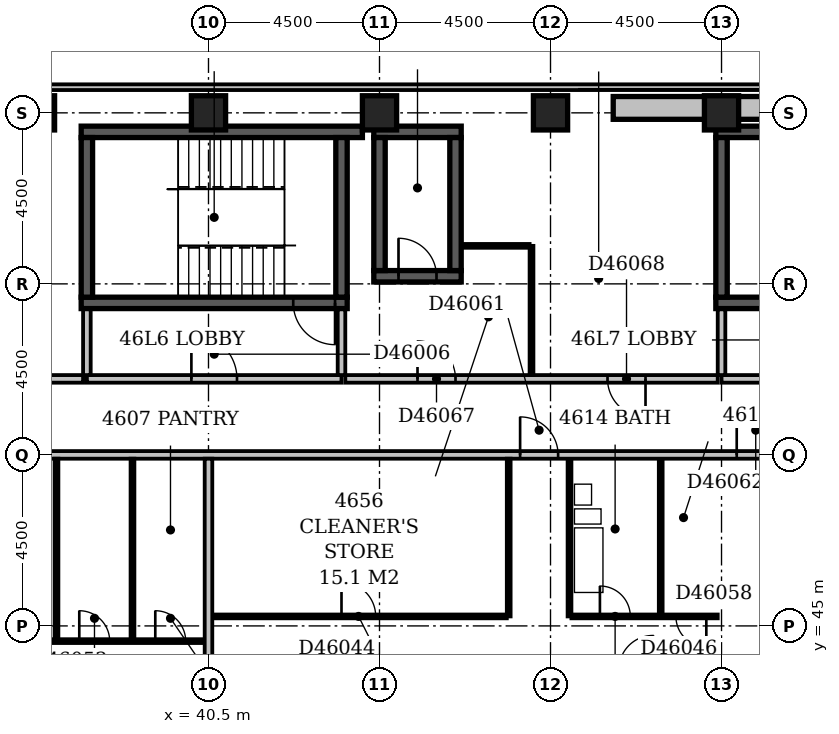
"""IFC4 building model, lengths in metres.
Left out: names, types, materials, properties, quantities, classifications, styles, units other than length and angle.
Written with IfcOpenShell. Run it as: python <this file> out.ifc"""

import sys

from ifc_helpers import new_model, si_unit, direction, frame, frame_2d, origin, origin_2d, place, context, subcontext, project, spatial, rectangle, extrude, element, fill, save


model = new_model("IFC4")
c1 = context("Model", 3, precision=1e-05, world=origin(), true_north=direction((0.0, 1.0)))
c2 = subcontext(c1, "Body", "Model", "MODEL_VIEW")
j1 = project(units=[si_unit("LENGTHUNIT", "METRE"), si_unit("PLANEANGLEUNIT", "RADIAN")], contexts=[c1])
p1 = place(None, origin())
s1 = spatial("IfcSite", under=j1, at=p1, CompositionType="ELEMENT")
p2 = place(p1, origin())
s2 = spatial("IfcBuilding", under=s1, at=p2, CompositionType="ELEMENT")
p3 = place(p2, frame((0.0, 0.0, 182.6)))
s3 = spatial("IfcBuildingStorey", under=s2, at=p3, CompositionType="ELEMENT", Elevation=182.6)
p4 = place(p3, frame((37.15, 53.5, -0.3), z_axis=(0.0, 0.0, 1.0), x_axis=(1.0, 0.0, 0.0)))
e1 = element("IfcWall", 1, at=p4, inside=s3, PredefinedType="SHEAR", context=c2, shape_type="SweptSolid", body=[
    extrude(rectangle(XDim=7.0, YDim=0.3, at=frame_2d((3.5, 0.0))), origin(), (0.0, 0.0, 1.0), 3.55),
])
p5 = place(p4, frame((5.58, 0.0, 0.3)))
e2 = element("IfcOpeningElement", 2, at=p5, cuts=e1, PredefinedType="OPENING", context=c2, shape_type="SweptSolid", body=[
    extrude(rectangle(XDim=1.1, YDim=2.1, at=frame_2d((0.55, 1.05))), frame((0.0, 0.162, 0.0), z_axis=(0.0, -1.0, 0.0), x_axis=(1.0, 0.0, 0.0)), (0.0, 0.0, 1.0), 0.324),
])
p6 = place(p3, frame((37.15, 58.0, -0.3), z_axis=(0.0, 0.0, 1.0), x_axis=(1.0, 0.0, 0.0)))
e3 = element("IfcWall", 3, at=p6, inside=s3, PredefinedType="SHEAR", context=c2, shape_type="SweptSolid", body=[
    extrude(rectangle(XDim=7.4, YDim=0.3, at=frame_2d((3.7, 0.0))), origin(), (0.0, 0.0, 1.0), 3.55),
])
for number, where, z_axis, x_axis in (
    (4, (37.3, 53.65, -0.3), (0.0, 0.0, 1.0), (0.0, 1.0, 0.0)),
    (5, (44.0, 53.65, -0.3), (0.0, 0.0, 1.0), (0.0, 1.0, 0.0)),
):
    element("IfcWall", number, at=place(p3, frame(where, z_axis=z_axis, x_axis=x_axis)), inside=s3, PredefinedType="SHEAR", context=c2, shape_type="SweptSolid", body=[
        extrude(rectangle(XDim=4.2, YDim=0.3, at=frame_2d((2.1, 0.0))), origin(), (0.0, 0.0, 1.0), 3.55),
    ])
p7 = place(p3, frame((44.85, 54.2, -0.3), z_axis=(0.0, 0.0, 1.0), x_axis=(1.0, 0.0, 0.0)))
e6 = element("IfcWall", 6, at=p7, inside=s3, PredefinedType="SHEAR", context=c2, shape_type="SweptSolid", body=[
    extrude(rectangle(XDim=2.3, YDim=0.3, at=frame_2d((1.15, 0.0))), origin(), (0.0, 0.0, 1.0), 3.55),
])
p8 = place(p7, frame((0.65, 0.0, 0.3)))
e7 = element("IfcOpeningElement", 7, at=p8, cuts=e6, PredefinedType="OPENING", context=c2, shape_type="SweptSolid", body=[
    extrude(rectangle(XDim=1.0, YDim=2.1, at=frame_2d((0.5, 1.05))), frame((0.0, 0.162, 0.0), z_axis=(0.0, -1.0, 0.0), x_axis=(1.0, 0.0, 0.0)), (0.0, 0.0, 1.0), 0.324),
])
p9 = place(p3, frame((44.85, 58.0, -0.3), z_axis=(0.0, 0.0, 1.0), x_axis=(1.0, 0.0, 0.0)))
e8 = element("IfcWall", 8, at=p9, inside=s3, PredefinedType="SHEAR", context=c2, shape_type="SweptSolid", body=[
    extrude(rectangle(XDim=2.3, YDim=0.3, at=frame_2d((1.15, 0.0))), origin(), (0.0, 0.0, 1.0), 3.55),
])
for number, where, z_axis, x_axis in (
    (9, (45.0, 54.35, -0.3), (0.0, 0.0, 1.0), (0.0, 1.0, 0.0)),
    (10, (47.0, 54.35, -0.3), (0.0, 0.0, 1.0), (0.0, 1.0, 0.0)),
):
    element("IfcWall", number, at=place(p3, frame(where, z_axis=z_axis, x_axis=x_axis)), inside=s3, PredefinedType="SHEAR", context=c2, shape_type="SweptSolid", body=[
        extrude(rectangle(XDim=3.5, YDim=0.3, at=frame_2d((1.75, 0.0))), origin(), (0.0, 0.0, 1.0), 3.55),
    ])
p10 = place(p3, frame((53.85, 53.5, -0.3), z_axis=(0.0, 0.0, 1.0), x_axis=(1.0, 0.0, 0.0)))
e11 = element("IfcWall", 11, at=p10, inside=s3, PredefinedType="SHEAR", context=c2, shape_type="SweptSolid", body=[
    extrude(rectangle(XDim=7.0, YDim=0.3, at=frame_2d((3.5, 0.0))), origin(), (0.0, 0.0, 1.0), 3.55),
])
p11 = place(p10, frame((5.58, 0.0, 0.3)))
e12 = element("IfcOpeningElement", 12, at=p11, cuts=e11, PredefinedType="OPENING", context=c2, shape_type="SweptSolid", body=[
    extrude(rectangle(XDim=1.1, YDim=2.1, at=frame_2d((0.55, 1.05))), frame((0.0, 0.162, 0.0), z_axis=(0.0, -1.0, 0.0), x_axis=(1.0, 0.0, 0.0)), (0.0, 0.0, 1.0), 0.324),
])
p12 = place(p3, frame((53.85, 58.0, -0.3), z_axis=(0.0, 0.0, 1.0), x_axis=(1.0, 0.0, 0.0)))
e13 = element("IfcWall", 13, at=p12, inside=s3, PredefinedType="SHEAR", context=c2, shape_type="SweptSolid", body=[
    extrude(rectangle(XDim=7.0, YDim=0.3, at=frame_2d((3.5, 0.0))), origin(), (0.0, 0.0, 1.0), 3.55),
])
p13 = place(p3, frame((54.0, 53.65, -0.3), z_axis=(0.0, 0.0, 1.0), x_axis=(0.0, 1.0, 0.0)))
e14 = element("IfcWall", 14, at=p13, inside=s3, PredefinedType="SHEAR", context=c2, shape_type="SweptSolid", body=[
    extrude(rectangle(XDim=4.2, YDim=0.3, at=frame_2d((2.1, 0.0))), origin(), (0.0, 0.0, 1.0), 3.55),
])
for number, where, z_axis, x_axis in (
    (15, (36.0, 58.5, -0.3), (0.0, 0.0, 1.0), (1.0, 0.0, 0.0)),
    (16, (40.5, 58.5, -0.3), (0.0, 0.0, 1.0), (1.0, 0.0, 0.0)),
    (17, (45.0, 58.5, -0.3), (0.0, 0.0, 1.0), (1.0, 0.0, 0.0)),
    (18, (49.5, 58.5, -0.3), (0.0, 0.0, 1.0), (1.0, 0.0, 0.0)),
    (19, (54.0, 58.5, -0.3), (0.0, 0.0, 1.0), (1.0, 0.0, 0.0)),
):
    element("IfcColumn", number, at=place(p3, frame(where, z_axis=z_axis, x_axis=x_axis)), inside=s3, PredefinedType="COLUMN", context=c2, shape_type="SweptSolid", body=[
        extrude(rectangle(XDim=0.9, YDim=0.9, at=origin_2d()), origin(), (0.0, 0.0, 1.0), 3.55),
    ])
p14 = place(p3, frame((68.1, 59.175, 0.0), z_axis=(0.0, 0.0, 1.0), x_axis=(-1.0, 0.0, 0.0)))
e20 = element("IfcWall", 20, at=p14, inside=s3, PredefinedType="STANDARD", context=c2, shape_type="SweptSolid", body=[
    extrude(rectangle(XDim=68.85, YDim=0.15, at=frame_2d((34.425, 0.0))), origin(), (0.0, 0.0, 1.0), 2.7),
])
p15 = place(p3, frame((51.15, 58.63, 3.6), z_axis=(0.0, 0.0, 1.0), x_axis=(1.0, 0.0, 0.0)))
e21 = element("IfcWall", 21, at=p15, inside=s3, PredefinedType="STANDARD", context=c2, shape_type="SweptSolid", body=[
    extrude(rectangle(XDim=16.38, YDim=0.6, at=frame_2d((8.19, 0.0))), origin(), (0.0, 0.0, 1.0), 0.6),
])
p16 = place(p3, frame((37.3, 51.5, 0.0), z_axis=(0.0, 0.0, 1.0), x_axis=(1.0, 0.0, 0.0)))
e22 = element("IfcWall", 22, at=p16, inside=s3, PredefinedType="PARTITIONING", context=c2, shape_type="SweptSolid", body=[
    extrude(rectangle(XDim=6.7, YDim=0.2, at=frame_2d((3.35, 0.0))), origin(), (0.0, 0.0, 1.0), 3.25),
])
p17 = place(p16, frame((2.75, 0.0, 0.0)))
e23 = element("IfcOpeningElement", 23, at=p17, cuts=e22, PredefinedType="OPENING", context=c2, shape_type="SweptSolid", body=[
    extrude(rectangle(XDim=1.2, YDim=2.1, at=frame_2d((0.6, 1.05))), frame((0.0, 0.112, 0.0), z_axis=(0.0, -1.0, 0.0), x_axis=(1.0, 0.0, 0.0)), (0.0, 0.0, 1.0), 0.224),
])
for number, where, z_axis, x_axis in (
    (24, (44.0, 51.6, 0.0), (0.0, 0.0, 1.0), (0.0, 1.0, 0.0)),
    (25, (37.3, 51.6, 0.0), (0.0, 0.0, 1.0), (0.0, 1.0, 0.0)),
):
    element("IfcWall", number, at=place(p3, frame(where, z_axis=z_axis, x_axis=x_axis)), inside=s3, PredefinedType="PARTITIONING", context=c2, shape_type="SweptSolid", body=[
        extrude(rectangle(XDim=1.73, YDim=0.2, at=frame_2d((0.865, 0.0))), origin(), (0.0, 0.0, 1.0), 3.25),
    ])
p18 = place(p3, frame((54.0, 51.5, 0.0), z_axis=(0.0, 0.0, 1.0), x_axis=(1.0, 0.0, 0.0)))
e26 = element("IfcWall", 26, at=p18, inside=s3, PredefinedType="PARTITIONING", context=c2, shape_type="SweptSolid", body=[
    extrude(rectangle(XDim=6.7, YDim=0.2, at=frame_2d((3.35, 0.0))), origin(), (0.0, 0.0, 1.0), 3.25),
])
p19 = place(p18, frame((2.75, 0.0, 0.0)))
e27 = element("IfcOpeningElement", 27, at=p19, cuts=e26, PredefinedType="OPENING", context=c2, shape_type="SweptSolid", body=[
    extrude(rectangle(XDim=1.2, YDim=2.1, at=frame_2d((0.6, 1.05))), frame((0.0, 0.112, 0.0), z_axis=(0.0, -1.0, 0.0), x_axis=(1.0, 0.0, 0.0)), (0.0, 0.0, 1.0), 0.224),
])
p20 = place(p3, frame((54.0, 51.6, 0.0), z_axis=(0.0, 0.0, 1.0), x_axis=(0.0, 1.0, 0.0)))
e28 = element("IfcWall", 28, at=p20, inside=s3, PredefinedType="PARTITIONING", context=c2, shape_type="SweptSolid", body=[
    extrude(rectangle(XDim=1.73, YDim=0.2, at=frame_2d((0.865, 0.0))), origin(), (0.0, 0.0, 1.0), 3.25),
])
p21 = place(p3, frame((40.5, 36.45, 0.0), z_axis=(0.0, 0.0, 1.0), x_axis=(0.0, 1.0, 0.0)))
e29 = element("IfcWall", 29, at=p21, inside=s3, PredefinedType="PARTITIONING", context=c2, shape_type="SweptSolid", body=[
    extrude(rectangle(XDim=12.95, YDim=0.2, at=frame_2d((6.475, 0.0))), origin(), (0.0, 0.0, 1.0), 3.25),
])
p22 = place(p3, frame((31.05, 44.6, 0.0), z_axis=(0.0, 0.0, 1.0), x_axis=(1.0, 0.0, 0.0)))
e30 = element("IfcWall", 30, at=p22, inside=s3, PredefinedType="PARTITIONING", context=c2, shape_type="SweptSolid", body=[
    extrude(rectangle(XDim=9.35, YDim=0.1, at=frame_2d((4.675, 0.0))), origin(), (0.0, 0.0, 1.0), 3.25),
])
p23 = place(p22, frame((0.75, 0.0, 0.0)))
e31 = element("IfcOpeningElement", 31, at=p23, cuts=e30, PredefinedType="OPENING", context=c2, shape_type="SweptSolid", body=[
    extrude(rectangle(XDim=0.8, YDim=2.1, at=frame_2d((0.4, 1.05))), frame((0.0, 0.062, 0.0), z_axis=(0.0, -1.0, 0.0), x_axis=(1.0, 0.0, 0.0)), (0.0, 0.0, 1.0), 0.124),
])
p24 = place(p22, frame((8.05, 0.0, 0.0)))
e32 = element("IfcOpeningElement", 32, at=p24, cuts=e30, PredefinedType="OPENING", context=c2, shape_type="SweptSolid", body=[
    extrude(rectangle(XDim=0.8, YDim=2.1, at=frame_2d((0.4, 1.05))), frame((0.0, 0.062, 0.0), z_axis=(0.0, -1.0, 0.0), x_axis=(1.0, 0.0, 0.0)), (0.0, 0.0, 1.0), 0.124),
])
p25 = place(p22, frame((4.25, 0.0, 0.0)))
e33 = element("IfcOpeningElement", 33, at=p25, cuts=e30, PredefinedType="OPENING", context=c2, shape_type="SweptSolid", body=[
    extrude(rectangle(XDim=0.8, YDim=2.1, at=frame_2d((0.4, 1.05))), frame((0.0, 0.062, 0.0), z_axis=(0.0, -1.0, 0.0), x_axis=(1.0, 0.0, 0.0)), (0.0, 0.0, 1.0), 0.124),
])
p26 = place(p22, frame((6.05, 0.0, 0.0)))
e34 = element("IfcOpeningElement", 34, at=p26, cuts=e30, PredefinedType="OPENING", context=c2, shape_type="SweptSolid", body=[
    extrude(rectangle(XDim=0.8, YDim=2.1, at=frame_2d((0.4, 1.05))), frame((0.0, 0.062, 0.0), z_axis=(0.0, -1.0, 0.0), x_axis=(1.0, 0.0, 0.0)), (0.0, 0.0, 1.0), 0.124),
])
p27 = place(p22, frame((2.7, 0.0, 0.0)))
e35 = element("IfcOpeningElement", 35, at=p27, cuts=e30, PredefinedType="OPENING", context=c2, shape_type="SweptSolid", body=[
    extrude(rectangle(XDim=0.8, YDim=2.1, at=frame_2d((0.4, 1.05))), frame((0.0, 0.062, 0.0), z_axis=(0.0, -1.0, 0.0), x_axis=(1.0, 0.0, 0.0)), (0.0, 0.0, 1.0), 0.124),
])
p28 = place(p3, frame((36.5, 44.65, 0.0), z_axis=(0.0, 0.0, 1.0), x_axis=(0.0, 1.0, 0.0)))
e36 = element("IfcWall", 36, at=p28, inside=s3, PredefinedType="PARTITIONING", context=c2, shape_type="SweptSolid", body=[
    extrude(rectangle(XDim=4.75, YDim=0.1, at=frame_2d((2.375, 0.0))), origin(), (0.0, 0.0, 1.0), 2.35),
])
p29 = place(p3, frame((38.5, 44.65, 0.0), z_axis=(0.0, 0.0, 1.0), x_axis=(0.0, 1.0, 0.0)))
e37 = element("IfcWall", 37, at=p29, inside=s3, PredefinedType="PARTITIONING", context=c2, shape_type="SweptSolid", body=[
    extrude(rectangle(XDim=4.75, YDim=0.1, at=frame_2d((2.375, 0.0))), origin(), (0.0, 0.0, 1.0), 3.25),
])
p30 = place(p3, frame((40.6, 45.25, 0.0), z_axis=(0.0, 0.0, 1.0), x_axis=(1.0, 0.0, 0.0)))
e38 = element("IfcWall", 38, at=p30, inside=s3, PredefinedType="PARTITIONING", context=c2, shape_type="SweptSolid", body=[
    extrude(rectangle(XDim=7.75, YDim=0.1, at=frame_2d((3.875, 0.0))), origin(), (0.0, 0.0, 1.0), 3.25),
])
p31 = place(p30, frame((3.4, 0.0, 0.0)))
e39 = element("IfcOpeningElement", 39, at=p31, cuts=e38, PredefinedType="OPENING", context=c2, shape_type="SweptSolid", body=[
    extrude(rectangle(XDim=0.9, YDim=2.1, at=frame_2d((0.45, 1.05))), frame((0.0, 0.062, 0.0), z_axis=(0.0, -1.0, 0.0), x_axis=(1.0, 0.0, 0.0)), (0.0, 0.0, 1.0), 0.124),
])
p32 = place(p3, frame((48.4, 45.25, 0.0), z_axis=(0.0, 0.0, 1.0), x_axis=(0.0, 1.0, 0.0)))
e40 = element("IfcWall", 40, at=p32, inside=s3, PredefinedType="PARTITIONING", context=c2, shape_type="SweptSolid", body=[
    extrude(rectangle(XDim=4.15, YDim=0.1, at=frame_2d((2.075, 0.0))), origin(), (0.0, 0.0, 1.0), 3.25),
])
p33 = place(p3, frame((50.0, 45.25, 0.0), z_axis=(0.0, 0.0, 1.0), x_axis=(0.0, 1.0, 0.0)))
e41 = element("IfcWall", 41, at=p33, inside=s3, PredefinedType="PLUMBINGWALL", context=c2, shape_type="SweptSolid", body=[
    extrude(rectangle(XDim=4.15, YDim=0.1, at=frame_2d((2.075, 0.0))), origin(), (0.0, 0.0, 1.0), 3.25),
])
p34 = place(p3, frame((50.05, 45.25, 0.0), z_axis=(0.0, 0.0, 1.0), x_axis=(1.0, 0.0, 0.0)))
e42 = element("IfcWall", 42, at=p34, inside=s3, PredefinedType="PARTITIONING", context=c2, shape_type="SweptSolid", body=[
    extrude(rectangle(XDim=3.85, YDim=0.1, at=frame_2d((1.925, 0.0))), origin(), (0.0, 0.0, 1.0), 3.25),
])
p35 = place(p34, frame((0.75, 0.0, 0.0)))
e43 = element("IfcOpeningElement", 43, at=p35, cuts=e42, PredefinedType="OPENING", context=c2, shape_type="SweptSolid", body=[
    extrude(rectangle(XDim=0.8, YDim=2.1, at=frame_2d((0.4, 1.05))), frame((0.0, 0.062, 0.0), z_axis=(0.0, -1.0, 0.0), x_axis=(1.0, 0.0, 0.0)), (0.0, 0.0, 1.0), 0.124),
])
p36 = place(p34, frame((2.75, 0.0, 0.0)))
e44 = element("IfcOpeningElement", 44, at=p36, cuts=e42, PredefinedType="OPENING", context=c2, shape_type="SweptSolid", body=[
    extrude(rectangle(XDim=0.8, YDim=2.1, at=frame_2d((0.4, 1.05))), frame((0.0, 0.062, 0.0), z_axis=(0.0, -1.0, 0.0), x_axis=(1.0, 0.0, 0.0)), (0.0, 0.0, 1.0), 0.124),
])
p37 = place(p3, frame((52.4, 45.3, 0.0), z_axis=(0.0, 0.0, 1.0), x_axis=(0.0, 1.0, 0.0)))
e45 = element("IfcWall", 45, at=p37, inside=s3, PredefinedType="PLUMBINGWALL", context=c2, shape_type="SweptSolid", body=[
    extrude(rectangle(XDim=4.1, YDim=0.1, at=frame_2d((2.05, 0.0))), origin(), (0.0, 0.0, 1.0), 3.25),
])
p38 = place(p3, frame((22.6, 49.5, 0.0), z_axis=(0.0, 0.0, 1.0), x_axis=(1.0, 0.0, 0.0)))
e46 = element("IfcWall", 46, at=p38, inside=s3, PredefinedType="PARTITIONING", context=c2, shape_type="SweptSolid", body=[
    extrude(rectangle(XDim=44.45, YDim=0.2, at=frame_2d((22.225, 0.0))), origin(), (0.0, 0.0, 1.0), 3.25),
])
p39 = place(p38, frame((7.1, 0.0, 0.0)))
e47 = element("IfcOpeningElement", 47, at=p39, cuts=e46, PredefinedType="OPENING", context=c2, shape_type="SweptSolid", body=[
    extrude(rectangle(XDim=1.0, YDim=2.1, at=frame_2d((0.5, 1.05))), frame((0.0, 0.112, 0.0), z_axis=(0.0, -1.0, 0.0), x_axis=(1.0, 0.0, 0.0)), (0.0, 0.0, 1.0), 0.224),
])
p40 = place(p38, frame((26.1, 0.0, 0.0)))
e48 = element("IfcOpeningElement", 48, at=p40, cuts=e46, PredefinedType="OPENING", context=c2, shape_type="SweptSolid", body=[
    extrude(rectangle(XDim=1.0, YDim=2.1, at=frame_2d((0.5, 1.05))), frame((0.0, 0.112, 0.0), z_axis=(0.0, -1.0, 0.0), x_axis=(1.0, 0.0, 0.0)), (0.0, 0.0, 1.0), 0.224),
])
p41 = place(p38, frame((31.8, 0.0, 0.0)))
e49 = element("IfcOpeningElement", 49, at=p41, cuts=e46, PredefinedType="OPENING", context=c2, shape_type="SweptSolid", body=[
    extrude(rectangle(XDim=1.0, YDim=2.1, at=frame_2d((0.5, 1.05))), frame((0.0, 0.112, 0.0), z_axis=(0.0, -1.0, 0.0), x_axis=(1.0, 0.0, 0.0)), (0.0, 0.0, 1.0), 0.224),
])
p42 = place(p3, frame((27.9, 51.5, 0.0), z_axis=(0.0, 0.0, 1.0), x_axis=(1.0, 0.0, 0.0)))
e50 = element("IfcWall", 50, at=p42, inside=s3, PredefinedType="PARTITIONING", context=c2, shape_type="SweptSolid", body=[
    extrude(rectangle(XDim=9.3, YDim=0.2, at=frame_2d((4.65, 0.0))), origin(), (0.0, 0.0, 1.0), 3.25),
])
p43 = place(p42, frame((1.5, 0.0, 0.0)))
e51 = element("IfcOpeningElement", 51, at=p43, cuts=e50, PredefinedType="OPENING", context=c2, shape_type="SweptSolid", body=[
    extrude(rectangle(XDim=1.0, YDim=2.1, at=frame_2d((0.5, 1.05))), frame((0.0, 0.112, 0.0), z_axis=(0.0, -1.0, 0.0), x_axis=(1.0, 0.0, 0.0)), (0.0, 0.0, 1.0), 0.224),
])
p44 = place(p42, frame((6.3, 0.0, 0.0)))
e52 = element("IfcOpeningElement", 52, at=p44, cuts=e50, PredefinedType="OPENING", context=c2, shape_type="SweptSolid", body=[
    extrude(rectangle(XDim=0.9, YDim=2.1, at=frame_2d((0.45, 1.05))), frame((0.0, 0.112, 0.0), z_axis=(0.0, -1.0, 0.0), x_axis=(1.0, 0.0, 0.0)), (0.0, 0.0, 1.0), 0.224),
])
p45 = place(p3, frame((44.1, 51.5, 0.0), z_axis=(0.0, 0.0, 1.0), x_axis=(1.0, 0.0, 0.0)))
e53 = element("IfcWall", 53, at=p45, inside=s3, PredefinedType="PARTITIONING", context=c2, shape_type="SweptSolid", body=[
    extrude(rectangle(XDim=9.8, YDim=0.2, at=frame_2d((4.9, 0.0))), origin(), (0.0, 0.0, 1.0), 3.25),
])
p46 = place(p45, frame((1.9, 0.0, 0.0)))
e54 = element("IfcOpeningElement", 54, at=p46, cuts=e53, PredefinedType="OPENING", context=c2, shape_type="SweptSolid", body=[
    extrude(rectangle(XDim=1.0, YDim=2.1, at=frame_2d((0.5, 1.05))), frame((0.0, 0.112, 0.0), z_axis=(0.0, -1.0, 0.0), x_axis=(1.0, 0.0, 0.0)), (0.0, 0.0, 1.0), 0.224),
])
p47 = place(p45, frame((6.9, 0.0, 0.0)))
e55 = element("IfcOpeningElement", 55, at=p47, cuts=e53, PredefinedType="OPENING", context=c2, shape_type="SweptSolid", body=[
    extrude(rectangle(XDim=1.0, YDim=2.1, at=frame_2d((0.5, 1.05))), frame((0.0, 0.112, 0.0), z_axis=(0.0, -1.0, 0.0), x_axis=(1.0, 0.0, 0.0)), (0.0, 0.0, 1.0), 0.224),
])
p48 = place(p3, frame((49.0, 51.6, 0.0), z_axis=(0.0, 0.0, 1.0), x_axis=(0.0, 1.0, 0.0)))
e56 = element("IfcWall", 56, at=p48, inside=s3, PredefinedType="PARTITIONING", context=c2, shape_type="SweptSolid", body=[
    extrude(rectangle(XDim=3.4, YDim=0.1, at=frame_2d((1.7, 0.0))), origin(), (0.0, 0.0, 1.0), 3.25),
])
p49 = place(p3, frame((47.15, 55.0, 0.0), z_axis=(0.0, 0.0, 1.0), x_axis=(1.0, 0.0, 0.0)))
e57 = element("IfcWall", 57, at=p49, inside=s3, PredefinedType="PARTITIONING", context=c2, shape_type="SweptSolid", body=[
    extrude(rectangle(XDim=1.8, YDim=0.1, at=frame_2d((0.9, 0.0))), origin(), (0.0, 0.0, 1.0), 3.25),
])
p50 = place(p17, origin())
e58 = element("IfcDoor", 58, at=p50, inside=s3, OperationType="SINGLE_SWING_LEFT", PredefinedType="DOOR", context=c2, shape_type="SweptSolid", body=[
    extrude(rectangle(XDim=1.2, YDim=2.1, at=frame_2d((0.6, 1.05))), frame((0.0, 0.025, 0.0), z_axis=(0.0, -1.0, 0.0), x_axis=(1.0, 0.0, 0.0)), (0.0, 0.0, 1.0), 0.05),
])
fill(e23, e58)
p51 = place(p8, origin())
e59 = element("IfcDoor", 59, at=p51, inside=s3, OperationType="SINGLE_SWING_LEFT", PredefinedType="DOOR", context=c2, shape_type="SweptSolid", body=[
    extrude(rectangle(XDim=1.0, YDim=2.1, at=frame_2d((0.5, 1.05))), frame((0.0, 0.025, 0.0), z_axis=(0.0, -1.0, 0.0), x_axis=(1.0, 0.0, 0.0)), (0.0, 0.0, 1.0), 0.05),
])
fill(e7, e59)
p52 = place(p5, origin())
e60 = element("IfcDoor", 60, at=p52, inside=s3, OperationType="SINGLE_SWING_RIGHT", PredefinedType="DOOR", context=c2, shape_type="SweptSolid", body=[
    extrude(rectangle(XDim=1.1, YDim=2.1, at=frame_2d((0.55, 1.05))), frame((0.0, 0.025, 0.0), z_axis=(0.0, -1.0, 0.0), x_axis=(1.0, 0.0, 0.0)), (0.0, 0.0, 1.0), 0.05),
])
fill(e2, e60)
p53 = place(p24, origin())
e61 = element("IfcDoor", 61, at=p53, inside=s3, OperationType="SINGLE_SWING_LEFT", PredefinedType="DOOR", context=c2, shape_type="SweptSolid", body=[
    extrude(rectangle(XDim=0.8, YDim=2.1, at=frame_2d((0.4, 1.05))), frame((0.0, 0.025, 0.0), z_axis=(0.0, -1.0, 0.0), x_axis=(1.0, 0.0, 0.0)), (0.0, 0.0, 1.0), 0.05),
])
fill(e32, e61)
p54 = place(p26, origin())
e62 = element("IfcDoor", 62, at=p54, inside=s3, OperationType="SINGLE_SWING_LEFT", PredefinedType="DOOR", context=c2, shape_type="SweptSolid", body=[
    extrude(rectangle(XDim=0.8, YDim=2.1, at=frame_2d((0.4, 1.05))), frame((0.0, 0.025, 0.0), z_axis=(0.0, -1.0, 0.0), x_axis=(1.0, 0.0, 0.0)), (0.0, 0.0, 1.0), 0.05),
])
fill(e34, e62)
p55 = place(p31, origin())
e63 = element("IfcDoor", 63, at=p55, inside=s3, OperationType="SINGLE_SWING_LEFT", PredefinedType="DOOR", context=c2, shape_type="SweptSolid", body=[
    extrude(rectangle(XDim=0.9, YDim=2.1, at=frame_2d((0.45, 1.05))), frame((0.0, 0.025, 0.0), z_axis=(0.0, -1.0, 0.0), x_axis=(1.0, 0.0, 0.0)), (0.0, 0.0, 1.0), 0.05),
])
fill(e39, e63)
p56 = place(p35, origin())
e64 = element("IfcDoor", 64, at=p56, inside=s3, OperationType="SINGLE_SWING_LEFT", PredefinedType="DOOR", context=c2, shape_type="SweptSolid", body=[
    extrude(rectangle(XDim=0.8, YDim=2.1, at=frame_2d((0.4, 1.05))), frame((0.0, 0.025, 0.0), z_axis=(0.0, -1.0, 0.0), x_axis=(1.0, 0.0, 0.0)), (0.0, 0.0, 1.0), 0.05),
])
fill(e43, e64)
p57 = place(p36, origin())
e65 = element("IfcDoor", 65, at=p57, inside=s3, OperationType="SINGLE_SWING_RIGHT", PredefinedType="DOOR", context=c2, shape_type="SweptSolid", body=[
    extrude(rectangle(XDim=0.8, YDim=2.1, at=frame_2d((0.4, 1.05))), frame((0.0, 0.025, 0.0), z_axis=(0.0, -1.0, 0.0), x_axis=(1.0, 0.0, 0.0)), (0.0, 0.0, 1.0), 0.05),
])
fill(e44, e65)
p58 = place(p40, origin())
e66 = element("IfcDoor", 66, at=p58, inside=s3, OperationType="SINGLE_SWING_LEFT", PredefinedType="DOOR", context=c2, shape_type="SweptSolid", body=[
    extrude(rectangle(XDim=1.0, YDim=2.1, at=frame_2d((0.5, 1.05))), frame((0.0, 0.025, 0.0), z_axis=(0.0, -1.0, 0.0), x_axis=(1.0, 0.0, 0.0)), (0.0, 0.0, 1.0), 0.05),
])
fill(e48, e66)
p59 = place(p41, origin())
e67 = element("IfcDoor", 67, at=p59, inside=s3, OperationType="SINGLE_SWING_LEFT", PredefinedType="DOOR", context=c2, shape_type="SweptSolid", body=[
    extrude(rectangle(XDim=1.0, YDim=2.1, at=frame_2d((0.5, 1.05))), frame((0.0, 0.025, 0.0), z_axis=(0.0, -1.0, 0.0), x_axis=(1.0, 0.0, 0.0)), (0.0, 0.0, 1.0), 0.05),
])
fill(e49, e67)
p60 = place(p46, origin())
e68 = element("IfcDoor", 68, at=p60, inside=s3, OperationType="SINGLE_SWING_LEFT", PredefinedType="DOOR", context=c2, shape_type="SweptSolid", body=[
    extrude(rectangle(XDim=1.0, YDim=2.1, at=frame_2d((0.5, 1.05))), frame((0.0, 0.025, 0.0), z_axis=(0.0, -1.0, 0.0), x_axis=(1.0, 0.0, 0.0)), (0.0, 0.0, 1.0), 0.05),
])
fill(e54, e68)
p61 = place(p47, origin())
e69 = element("IfcDoor", 69, at=p61, inside=s3, OperationType="SINGLE_SWING_RIGHT", PredefinedType="DOOR", context=c2, shape_type="SweptSolid", body=[
    extrude(rectangle(XDim=1.0, YDim=2.1, at=frame_2d((0.5, 1.05))), frame((0.0, 0.025, 0.0), z_axis=(0.0, -1.0, 0.0), x_axis=(1.0, 0.0, 0.0)), (0.0, 0.0, 1.0), 0.05),
])
fill(e55, e69)
save(model, sys.argv[1])
